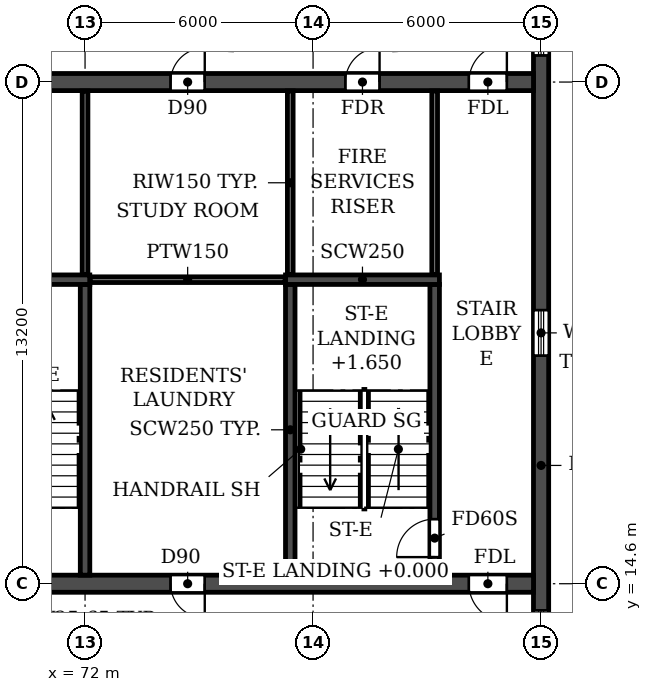
"""IFC4 building model, lengths in metres.
Left out: names, types, materials, properties, quantities, classifications, styles, units other than length and angle.
Written with IfcOpenShell. Run it as: python <this file> out.ifc"""

import sys

from ifc_helpers import new_model, si_unit, direction, frame, frame_2d, origin, place, context, subcontext, project, spatial, rectangle, extrude, element, fill, save


model = new_model("IFC4")
c1 = context("Model", 3, precision=1e-05, world=origin(), true_north=direction((0.0, 1.0)))
c2 = subcontext(c1, "Body", "Model", "MODEL_VIEW")
j1 = project(units=[si_unit("LENGTHUNIT", "METRE"), si_unit("PLANEANGLEUNIT", "RADIAN")], contexts=[c1])
p1 = place(None, origin())
s1 = spatial("IfcSite", under=j1, at=p1, CompositionType="ELEMENT")
p2 = place(p1, origin())
s2 = spatial("IfcBuilding", under=s1, at=p2, CompositionType="ELEMENT")
p3 = place(p2, frame((0.0, 0.0, 158.7)))
s3 = spatial("IfcBuildingStorey", under=s2, at=p3, CompositionType="ELEMENT", Elevation=158.7)
p4 = place(p3, frame((84.0, 4.683, 0.0), z_axis=(0.0, 0.0, 1.0), x_axis=(0.0, 1.0, 0.0)))
e1 = element("IfcWall", 1, at=p4, inside=s3, PredefinedType="SHEAR", context=c2, shape_type="SweptSolid", body=[
    extrude(rectangle(XDim=33.034, YDim=0.4, at=frame_2d((16.517, 0.0))), origin(), (0.0, 0.0, 1.0), 3.07),
])
p5 = place(p4, frame((23.817, 0.0, 0.9)))
e2 = element("IfcOpeningElement", 2, at=p5, cuts=e1, PredefinedType="OPENING", context=c2, shape_type="SweptSolid", body=[
    extrude(rectangle(XDim=1.2, YDim=1.5, at=frame_2d((0.6, 0.75))), frame((0.0, 0.21, 0.0), z_axis=(0.0, -1.0, 0.0), x_axis=(1.0, 0.0, 0.0)), (0.0, 0.0, 1.0), 0.42),
])
p6 = place(p4, frame((8.017, 0.0, 0.9)))
e3 = element("IfcOpeningElement", 3, at=p6, cuts=e1, PredefinedType="OPENING", context=c2, shape_type="SweptSolid", body=[
    extrude(rectangle(XDim=1.2, YDim=1.5, at=frame_2d((0.6, 0.75))), frame((0.0, 0.21, 0.0), z_axis=(0.0, -1.0, 0.0), x_axis=(1.0, 0.0, 0.0)), (0.0, 0.0, 1.0), 0.42),
])
p7 = place(p4, frame((15.917, 0.0, 0.9)))
e4 = element("IfcOpeningElement", 4, at=p7, cuts=e1, PredefinedType="OPENING", context=c2, shape_type="SweptSolid", body=[
    extrude(rectangle(XDim=1.2, YDim=1.5, at=frame_2d((0.6, 0.75))), frame((0.0, 0.21, 0.0), z_axis=(0.0, -1.0, 0.0), x_axis=(1.0, 0.0, 0.0)), (0.0, 0.0, 1.0), 0.42),
])
p8 = place(p4, frame((28.876, 0.0, 0.0)))
e5 = element("IfcOpeningElement", 5, at=p8, cuts=e1, PredefinedType="OPENING", context=c2, shape_type="SweptSolid", body=[
    extrude(rectangle(XDim=1.0, YDim=2.1, at=frame_2d((0.5, 1.05))), frame((0.0, 0.21, 0.0), z_axis=(0.0, -1.0, 0.0), x_axis=(1.0, 0.0, 0.0)), (0.0, 0.0, 1.0), 0.42),
])
p9 = place(p4, frame((5.617, 0.0, 0.0)))
e6 = element("IfcOpeningElement", 6, at=p9, cuts=e1, PredefinedType="OPENING", context=c2, shape_type="SweptSolid", body=[
    extrude(rectangle(XDim=1.0, YDim=2.1, at=frame_2d((0.5, 1.05))), frame((0.0, 0.21, 0.0), z_axis=(0.0, -1.0, 0.0), x_axis=(1.0, 0.0, 0.0)), (0.0, 0.0, 1.0), 0.42),
])
p10 = place(p3, frame((18.2, 14.6, 0.0), z_axis=(0.0, 0.0, 1.0), x_axis=(1.0, 0.0, 0.0)))
e7 = element("IfcWall", 7, at=p10, inside=s3, PredefinedType="SOLIDWALL", context=c2, shape_type="SweptSolid", body=[
    extrude(rectangle(XDim=65.6, YDim=0.45, at=frame_2d((32.8, 0.0))), origin(), (0.0, 0.0, 1.0), 3.07),
])
p11 = place(p10, frame((0.7, 0.0, 0.0)))
e8 = element("IfcOpeningElement", 8, at=p11, cuts=e7, PredefinedType="OPENING", context=c2, shape_type="SweptSolid", body=[
    extrude(rectangle(XDim=1.0, YDim=2.1, at=frame_2d((0.5, 1.05))), frame((0.0, 0.235, 0.0), z_axis=(0.0, -1.0, 0.0), x_axis=(1.0, 0.0, 0.0)), (0.0, 0.0, 1.0), 0.47),
])
p12 = place(p10, frame((8.65, 0.0, 0.0)))
e9 = element("IfcOpeningElement", 9, at=p12, cuts=e7, PredefinedType="OPENING", context=c2, shape_type="SweptSolid", body=[
    extrude(rectangle(XDim=0.9, YDim=2.1, at=frame_2d((0.45, 1.05))), frame((0.0, 0.235, 0.0), z_axis=(0.0, -1.0, 0.0), x_axis=(1.0, 0.0, 0.0)), (0.0, 0.0, 1.0), 0.47),
])
p13 = place(p10, frame((13.2, 0.0, 0.0)))
e10 = element("IfcOpeningElement", 10, at=p13, cuts=e7, PredefinedType="OPENING", context=c2, shape_type="SweptSolid", body=[
    extrude(rectangle(XDim=1.0, YDim=2.1, at=frame_2d((0.5, 1.05))), frame((0.0, 0.235, 0.0), z_axis=(0.0, -1.0, 0.0), x_axis=(1.0, 0.0, 0.0)), (0.0, 0.0, 1.0), 0.47),
])
p14 = place(p10, frame((27.1, 0.0, 0.0)))
e11 = element("IfcOpeningElement", 11, at=p14, cuts=e7, PredefinedType="OPENING", context=c2, shape_type="SweptSolid", body=[
    extrude(rectangle(XDim=1.0, YDim=2.1, at=frame_2d((0.5, 1.05))), frame((0.0, 0.235, 0.0), z_axis=(0.0, -1.0, 0.0), x_axis=(1.0, 0.0, 0.0)), (0.0, 0.0, 1.0), 0.47),
])
p15 = place(p10, frame((32.3, 0.0, 0.0)))
e12 = element("IfcOpeningElement", 12, at=p15, cuts=e7, PredefinedType="OPENING", context=c2, shape_type="SweptSolid", body=[
    extrude(rectangle(XDim=1.0, YDim=2.1, at=frame_2d((0.5, 1.05))), frame((0.0, 0.235, 0.0), z_axis=(0.0, -1.0, 0.0), x_axis=(1.0, 0.0, 0.0)), (0.0, 0.0, 1.0), 0.47),
])
p16 = place(p10, frame((37.25, 0.0, 0.0)))
e13 = element("IfcOpeningElement", 13, at=p16, cuts=e7, PredefinedType="OPENING", context=c2, shape_type="SweptSolid", body=[
    extrude(rectangle(XDim=1.5, YDim=2.1, at=frame_2d((0.75, 1.05))), frame((0.0, 0.235, 0.0), z_axis=(0.0, -1.0, 0.0), x_axis=(1.0, 0.0, 0.0)), (0.0, 0.0, 1.0), 0.47),
])
p17 = place(p10, frame((51.4, 0.0, 0.0)))
e14 = element("IfcOpeningElement", 14, at=p17, cuts=e7, PredefinedType="OPENING", context=c2, shape_type="SweptSolid", body=[
    extrude(rectangle(XDim=1.0, YDim=2.1, at=frame_2d((0.5, 1.05))), frame((0.0, 0.235, 0.0), z_axis=(0.0, -1.0, 0.0), x_axis=(1.0, 0.0, 0.0)), (0.0, 0.0, 1.0), 0.47),
])
p18 = place(p10, frame((56.05, 0.0, 0.0)))
e15 = element("IfcOpeningElement", 15, at=p18, cuts=e7, PredefinedType="OPENING", context=c2, shape_type="SweptSolid", body=[
    extrude(rectangle(XDim=0.9, YDim=2.1, at=frame_2d((0.45, 1.05))), frame((0.0, 0.235, 0.0), z_axis=(0.0, -1.0, 0.0), x_axis=(1.0, 0.0, 0.0)), (0.0, 0.0, 1.0), 0.47),
])
p19 = place(p10, frame((63.9, 0.0, 0.0)))
e16 = element("IfcOpeningElement", 16, at=p19, cuts=e7, PredefinedType="OPENING", context=c2, shape_type="SweptSolid", body=[
    extrude(rectangle(XDim=1.0, YDim=2.1, at=frame_2d((0.5, 1.05))), frame((0.0, 0.235, 0.0), z_axis=(0.0, -1.0, 0.0), x_axis=(1.0, 0.0, 0.0)), (0.0, 0.0, 1.0), 0.47),
])
p20 = place(p3, frame((18.2, 27.8, 0.0), z_axis=(0.0, 0.0, 1.0), x_axis=(1.0, 0.0, 0.0)))
e17 = element("IfcWall", 17, at=p20, inside=s3, PredefinedType="SOLIDWALL", context=c2, shape_type="SweptSolid", body=[
    extrude(rectangle(XDim=65.6, YDim=0.45, at=frame_2d((32.8, 0.0))), origin(), (0.0, 0.0, 1.0), 3.07),
])
p21 = place(p20, frame((0.7, 0.0, 0.0)))
e18 = element("IfcOpeningElement", 18, at=p21, cuts=e17, PredefinedType="OPENING", context=c2, shape_type="SweptSolid", body=[
    extrude(rectangle(XDim=1.0, YDim=2.1, at=frame_2d((0.5, 1.05))), frame((0.0, 0.235, 0.0), z_axis=(0.0, -1.0, 0.0), x_axis=(1.0, 0.0, 0.0)), (0.0, 0.0, 1.0), 0.47),
])
p22 = place(p20, frame((4.05, 0.0, 0.0)))
e19 = element("IfcOpeningElement", 19, at=p22, cuts=e17, PredefinedType="OPENING", context=c2, shape_type="SweptSolid", body=[
    extrude(rectangle(XDim=0.9, YDim=2.1, at=frame_2d((0.45, 1.05))), frame((0.0, 0.235, 0.0), z_axis=(0.0, -1.0, 0.0), x_axis=(1.0, 0.0, 0.0)), (0.0, 0.0, 1.0), 0.47),
])
p23 = place(p20, frame((8.65, 0.0, 0.0)))
e20 = element("IfcOpeningElement", 20, at=p23, cuts=e17, PredefinedType="OPENING", context=c2, shape_type="SweptSolid", body=[
    extrude(rectangle(XDim=0.9, YDim=2.1, at=frame_2d((0.45, 1.05))), frame((0.0, 0.235, 0.0), z_axis=(0.0, -1.0, 0.0), x_axis=(1.0, 0.0, 0.0)), (0.0, 0.0, 1.0), 0.47),
])
p24 = place(p20, frame((13.25, 0.0, 0.0)))
e21 = element("IfcOpeningElement", 21, at=p24, cuts=e17, PredefinedType="OPENING", context=c2, shape_type="SweptSolid", body=[
    extrude(rectangle(XDim=0.9, YDim=2.1, at=frame_2d((0.45, 1.05))), frame((0.0, 0.235, 0.0), z_axis=(0.0, -1.0, 0.0), x_axis=(1.0, 0.0, 0.0)), (0.0, 0.0, 1.0), 0.47),
])
p25 = place(p20, frame((19.0, 0.0, 0.0)))
e22 = element("IfcOpeningElement", 22, at=p25, cuts=e17, PredefinedType="OPENING", context=c2, shape_type="SweptSolid", body=[
    extrude(rectangle(XDim=1.0, YDim=2.1, at=frame_2d((0.5, 1.05))), frame((0.0, 0.235, 0.0), z_axis=(0.0, -1.0, 0.0), x_axis=(1.0, 0.0, 0.0)), (0.0, 0.0, 1.0), 0.47),
])
p26 = place(p20, frame((24.2, 0.0, 0.0)))
e23 = element("IfcOpeningElement", 23, at=p26, cuts=e17, PredefinedType="OPENING", context=c2, shape_type="SweptSolid", body=[
    extrude(rectangle(XDim=1.0, YDim=2.1, at=frame_2d((0.5, 1.05))), frame((0.0, 0.235, 0.0), z_axis=(0.0, -1.0, 0.0), x_axis=(1.0, 0.0, 0.0)), (0.0, 0.0, 1.0), 0.47),
])
p27 = place(p20, frame((29.4, 0.0, 0.0)))
e24 = element("IfcOpeningElement", 24, at=p27, cuts=e17, PredefinedType="OPENING", context=c2, shape_type="SweptSolid", body=[
    extrude(rectangle(XDim=1.0, YDim=2.1, at=frame_2d((0.5, 1.05))), frame((0.0, 0.235, 0.0), z_axis=(0.0, -1.0, 0.0), x_axis=(1.0, 0.0, 0.0)), (0.0, 0.0, 1.0), 0.47),
])
p28 = place(p20, frame((32.3, 0.0, 0.0)))
e25 = element("IfcOpeningElement", 25, at=p28, cuts=e17, PredefinedType="OPENING", context=c2, shape_type="SweptSolid", body=[
    extrude(rectangle(XDim=1.0, YDim=2.1, at=frame_2d((0.5, 1.05))), frame((0.0, 0.235, 0.0), z_axis=(0.0, -1.0, 0.0), x_axis=(1.0, 0.0, 0.0)), (0.0, 0.0, 1.0), 0.47),
])
p29 = place(p20, frame((35.2, 0.0, 0.0)))
e26 = element("IfcOpeningElement", 26, at=p29, cuts=e17, PredefinedType="OPENING", context=c2, shape_type="SweptSolid", body=[
    extrude(rectangle(XDim=1.0, YDim=2.1, at=frame_2d((0.5, 1.05))), frame((0.0, 0.235, 0.0), z_axis=(0.0, -1.0, 0.0), x_axis=(1.0, 0.0, 0.0)), (0.0, 0.0, 1.0), 0.47),
])
p30 = place(p20, frame((37.8, 0.0, 0.0)))
e27 = element("IfcOpeningElement", 27, at=p30, cuts=e17, PredefinedType="OPENING", context=c2, shape_type="SweptSolid", body=[
    extrude(rectangle(XDim=1.0, YDim=2.1, at=frame_2d((0.5, 1.05))), frame((0.0, 0.235, 0.0), z_axis=(0.0, -1.0, 0.0), x_axis=(1.0, 0.0, 0.0)), (0.0, 0.0, 1.0), 0.47),
])
p31 = place(p20, frame((40.4, 0.0, 0.0)))
e28 = element("IfcOpeningElement", 28, at=p31, cuts=e17, PredefinedType="OPENING", context=c2, shape_type="SweptSolid", body=[
    extrude(rectangle(XDim=1.0, YDim=2.1, at=frame_2d((0.5, 1.05))), frame((0.0, 0.235, 0.0), z_axis=(0.0, -1.0, 0.0), x_axis=(1.0, 0.0, 0.0)), (0.0, 0.0, 1.0), 0.47),
])
p32 = place(p20, frame((43.0, 0.0, 0.0)))
e29 = element("IfcOpeningElement", 29, at=p32, cuts=e17, PredefinedType="OPENING", context=c2, shape_type="SweptSolid", body=[
    extrude(rectangle(XDim=1.0, YDim=2.1, at=frame_2d((0.5, 1.05))), frame((0.0, 0.235, 0.0), z_axis=(0.0, -1.0, 0.0), x_axis=(1.0, 0.0, 0.0)), (0.0, 0.0, 1.0), 0.47),
])
p33 = place(p20, frame((46.9, 0.0, 0.0)))
e30 = element("IfcOpeningElement", 30, at=p33, cuts=e17, PredefinedType="OPENING", context=c2, shape_type="SweptSolid", body=[
    extrude(rectangle(XDim=1.0, YDim=2.1, at=frame_2d((0.5, 1.05))), frame((0.0, 0.235, 0.0), z_axis=(0.0, -1.0, 0.0), x_axis=(1.0, 0.0, 0.0)), (0.0, 0.0, 1.0), 0.47),
])
p34 = place(p20, frame((51.45, 0.0, 0.0)))
e31 = element("IfcOpeningElement", 31, at=p34, cuts=e17, PredefinedType="OPENING", context=c2, shape_type="SweptSolid", body=[
    extrude(rectangle(XDim=0.9, YDim=2.1, at=frame_2d((0.45, 1.05))), frame((0.0, 0.235, 0.0), z_axis=(0.0, -1.0, 0.0), x_axis=(1.0, 0.0, 0.0)), (0.0, 0.0, 1.0), 0.47),
])
p35 = place(p20, frame((56.05, 0.0, 0.0)))
e32 = element("IfcOpeningElement", 32, at=p35, cuts=e17, PredefinedType="OPENING", context=c2, shape_type="SweptSolid", body=[
    extrude(rectangle(XDim=0.9, YDim=2.1, at=frame_2d((0.45, 1.05))), frame((0.0, 0.235, 0.0), z_axis=(0.0, -1.0, 0.0), x_axis=(1.0, 0.0, 0.0)), (0.0, 0.0, 1.0), 0.47),
])
p36 = place(p20, frame((60.65, 0.0, 0.0)))
e33 = element("IfcOpeningElement", 33, at=p36, cuts=e17, PredefinedType="OPENING", context=c2, shape_type="SweptSolid", body=[
    extrude(rectangle(XDim=0.9, YDim=2.1, at=frame_2d((0.45, 1.05))), frame((0.0, 0.235, 0.0), z_axis=(0.0, -1.0, 0.0), x_axis=(1.0, 0.0, 0.0)), (0.0, 0.0, 1.0), 0.47),
])
p37 = place(p20, frame((63.9, 0.0, 0.0)))
e34 = element("IfcOpeningElement", 34, at=p37, cuts=e17, PredefinedType="OPENING", context=c2, shape_type="SweptSolid", body=[
    extrude(rectangle(XDim=1.0, YDim=2.1, at=frame_2d((0.5, 1.05))), frame((0.0, 0.235, 0.0), z_axis=(0.0, -1.0, 0.0), x_axis=(1.0, 0.0, 0.0)), (0.0, 0.0, 1.0), 0.47),
])
p38 = place(p3, frame((72.0, 14.825, 0.0), z_axis=(0.0, 0.0, 1.0), x_axis=(0.0, 1.0, 0.0)))
e35 = element("IfcWall", 35, at=p38, inside=s3, PredefinedType="SOLIDWALL", context=c2, shape_type="SweptSolid", body=[
    extrude(rectangle(XDim=7.65, YDim=0.25, at=frame_2d((3.825, 0.0))), origin(), (0.0, 0.0, 1.0), 3.07),
])
p39 = place(p3, frame((68.075, 22.6, 0.0), z_axis=(0.0, 0.0, 1.0), x_axis=(1.0, 0.0, 0.0)))
e36 = element("IfcWall", 36, at=p39, inside=s3, PredefinedType="SOLIDWALL", context=c2, shape_type="SweptSolid", body=[
    extrude(rectangle(XDim=4.05, YDim=0.25, at=frame_2d((2.025, 0.0))), origin(), (0.0, 0.0, 1.0), 3.07),
])
p40 = place(p3, frame((77.4, 14.825, 0.0), z_axis=(0.0, 0.0, 1.0), x_axis=(0.0, 1.0, 0.0)))
e37 = element("IfcWall", 37, at=p40, inside=s3, PredefinedType="SOLIDWALL", context=c2, shape_type="SweptSolid", body=[
    extrude(rectangle(XDim=7.65, YDim=0.25, at=frame_2d((3.825, 0.0))), origin(), (0.0, 0.0, 1.0), 3.07),
])
p41 = place(p3, frame((81.2, 14.825, 0.0), z_axis=(0.0, 0.0, 1.0), x_axis=(0.0, 1.0, 0.0)))
e38 = element("IfcWall", 38, at=p41, inside=s3, PredefinedType="SOLIDWALL", context=c2, shape_type="SweptSolid", body=[
    extrude(rectangle(XDim=7.65, YDim=0.25, at=frame_2d((3.825, 0.0))), origin(), (0.0, 0.0, 1.0), 3.07),
])
p42 = place(p41, frame((0.475, 0.0, 0.0)))
e39 = element("IfcOpeningElement", 39, at=p42, cuts=e38, PredefinedType="OPENING", context=c2, shape_type="SweptSolid", body=[
    extrude(rectangle(XDim=1.0, YDim=2.1, at=frame_2d((0.5, 1.05))), frame((0.0, 0.135, 0.0), z_axis=(0.0, -1.0, 0.0), x_axis=(1.0, 0.0, 0.0)), (0.0, 0.0, 1.0), 0.27),
])
p43 = place(p3, frame((77.275, 22.6, 0.0), z_axis=(0.0, 0.0, 1.0), x_axis=(1.0, 0.0, 0.0)))
e40 = element("IfcWall", 40, at=p43, inside=s3, PredefinedType="SOLIDWALL", context=c2, shape_type="SweptSolid", body=[
    extrude(rectangle(XDim=4.05, YDim=0.25, at=frame_2d((2.025, 0.0))), origin(), (0.0, 0.0, 1.0), 3.07),
])
p44 = place(p3, frame((72.135, 22.6, 0.0), z_axis=(0.0, 0.0, 1.0), x_axis=(1.0, 0.0, 0.0)))
e41 = element("IfcWall", 41, at=p44, inside=s3, PredefinedType="PARTITIONING", context=c2, shape_type="SweptSolid", body=[
    extrude(rectangle(XDim=5.13, YDim=0.15, at=frame_2d((2.565, 0.0))), origin(), (0.0, 0.0, 1.0), 3.07),
])
for number, where, z_axis, x_axis in (
    (42, (72.0, 22.735, 0.0), (0.0, 0.0, 1.0), (0.0, 1.0, 0.0)),
    (43, (77.4, 22.735, 0.0), (0.0, 0.0, 1.0), (0.0, 1.0, 0.0)),
    (44, (81.2, 22.735, 0.0), (0.0, 0.0, 1.0), (0.0, 1.0, 0.0)),
):
    element("IfcWall", number, at=place(p3, frame(where, z_axis=z_axis, x_axis=x_axis)), inside=s3, PredefinedType="PARTITIONING", context=c2, shape_type="SweptSolid", body=[
        extrude(rectangle(XDim=4.83, YDim=0.15, at=frame_2d((2.415, 0.0))), origin(), (0.0, 0.0, 1.0), 3.07),
    ])
p45 = place(p5, origin())
e45 = element("IfcWindow", 45, at=p45, inside=s3, PartitioningType="SINGLE_PANEL", PredefinedType="WINDOW", context=c2, shape_type="SweptSolid", body=[
    extrude(rectangle(XDim=1.2, YDim=1.5, at=frame_2d((0.6, 0.75))), frame((0.0, 0.03, 0.0), z_axis=(0.0, -1.0, 0.0), x_axis=(1.0, 0.0, 0.0)), (0.0, 0.0, 1.0), 0.06),
])
fill(e2, e45)
p46 = place(p6, origin())
e46 = element("IfcWindow", 46, at=p46, inside=s3, PartitioningType="SINGLE_PANEL", PredefinedType="WINDOW", context=c2, shape_type="SweptSolid", body=[
    extrude(rectangle(XDim=1.2, YDim=1.5, at=frame_2d((0.6, 0.75))), frame((0.0, 0.03, 0.0), z_axis=(0.0, -1.0, 0.0), x_axis=(1.0, 0.0, 0.0)), (0.0, 0.0, 1.0), 0.06),
])
fill(e3, e46)
p47 = place(p7, origin())
e47 = element("IfcWindow", 47, at=p47, inside=s3, PartitioningType="SINGLE_PANEL", PredefinedType="WINDOW", context=c2, shape_type="SweptSolid", body=[
    extrude(rectangle(XDim=1.2, YDim=1.5, at=frame_2d((0.6, 0.75))), frame((0.0, 0.03, 0.0), z_axis=(0.0, -1.0, 0.0), x_axis=(1.0, 0.0, 0.0)), (0.0, 0.0, 1.0), 0.06),
])
fill(e4, e47)
p48 = place(p35, origin())
e48 = element("IfcDoor", 48, at=p48, inside=s3, OperationType="SINGLE_SWING_RIGHT", PredefinedType="DOOR", context=c2, shape_type="SweptSolid", body=[
    extrude(rectangle(XDim=0.9, YDim=2.1, at=frame_2d((0.45, 1.05))), frame((0.0, 0.025, 0.0), z_axis=(0.0, -1.0, 0.0), x_axis=(1.0, 0.0, 0.0)), (0.0, 0.0, 1.0), 0.05),
])
fill(e32, e48)
p49 = place(p36, origin())
e49 = element("IfcDoor", 49, at=p49, inside=s3, OperationType="SINGLE_SWING_RIGHT", PredefinedType="DOOR", context=c2, shape_type="SweptSolid", body=[
    extrude(rectangle(XDim=0.9, YDim=2.1, at=frame_2d((0.45, 1.05))), frame((0.0, 0.025, 0.0), z_axis=(0.0, -1.0, 0.0), x_axis=(1.0, 0.0, 0.0)), (0.0, 0.0, 1.0), 0.05),
])
fill(e33, e49)
p50 = place(p37, origin())
e50 = element("IfcDoor", 50, at=p50, inside=s3, OperationType="SINGLE_SWING_RIGHT", PredefinedType="DOOR", context=c2, shape_type="SweptSolid", body=[
    extrude(rectangle(XDim=1.0, YDim=2.1, at=frame_2d((0.5, 1.05))), frame((0.0, 0.025, 0.0), z_axis=(0.0, -1.0, 0.0), x_axis=(1.0, 0.0, 0.0)), (0.0, 0.0, 1.0), 0.05),
])
fill(e34, e50)
p51 = place(p18, frame((0.9, 0.0, 0.0), z_axis=(0.0, 0.0, 1.0), x_axis=(-1.0, 0.0, 0.0)))
e51 = element("IfcDoor", 51, at=p51, inside=s3, OperationType="SINGLE_SWING_LEFT", PredefinedType="DOOR", context=c2, shape_type="SweptSolid", body=[
    extrude(rectangle(XDim=0.9, YDim=2.1, at=frame_2d((0.45, 1.05))), frame((0.0, 0.025, 0.0), z_axis=(0.0, -1.0, 0.0), x_axis=(1.0, 0.0, 0.0)), (0.0, 0.0, 1.0), 0.05),
])
fill(e15, e51)
p52 = place(p19, frame((1.0, 0.0, 0.0), z_axis=(0.0, 0.0, 1.0), x_axis=(-1.0, 0.0, 0.0)))
e52 = element("IfcDoor", 52, at=p52, inside=s3, OperationType="SINGLE_SWING_LEFT", PredefinedType="DOOR", context=c2, shape_type="SweptSolid", body=[
    extrude(rectangle(XDim=1.0, YDim=2.1, at=frame_2d((0.5, 1.05))), frame((0.0, 0.025, 0.0), z_axis=(0.0, -1.0, 0.0), x_axis=(1.0, 0.0, 0.0)), (0.0, 0.0, 1.0), 0.05),
])
fill(e16, e52)
p53 = place(p42, origin())
e53 = element("IfcDoor", 53, at=p53, inside=s3, OperationType="SINGLE_SWING_LEFT", PredefinedType="DOOR", context=c2, shape_type="SweptSolid", body=[
    extrude(rectangle(XDim=1.0, YDim=2.1, at=frame_2d((0.5, 1.05))), frame((0.0, 0.025, 0.0), z_axis=(0.0, -1.0, 0.0), x_axis=(1.0, 0.0, 0.0)), (0.0, 0.0, 1.0), 0.05),
])
fill(e39, e53)
save(model, sys.argv[1])
